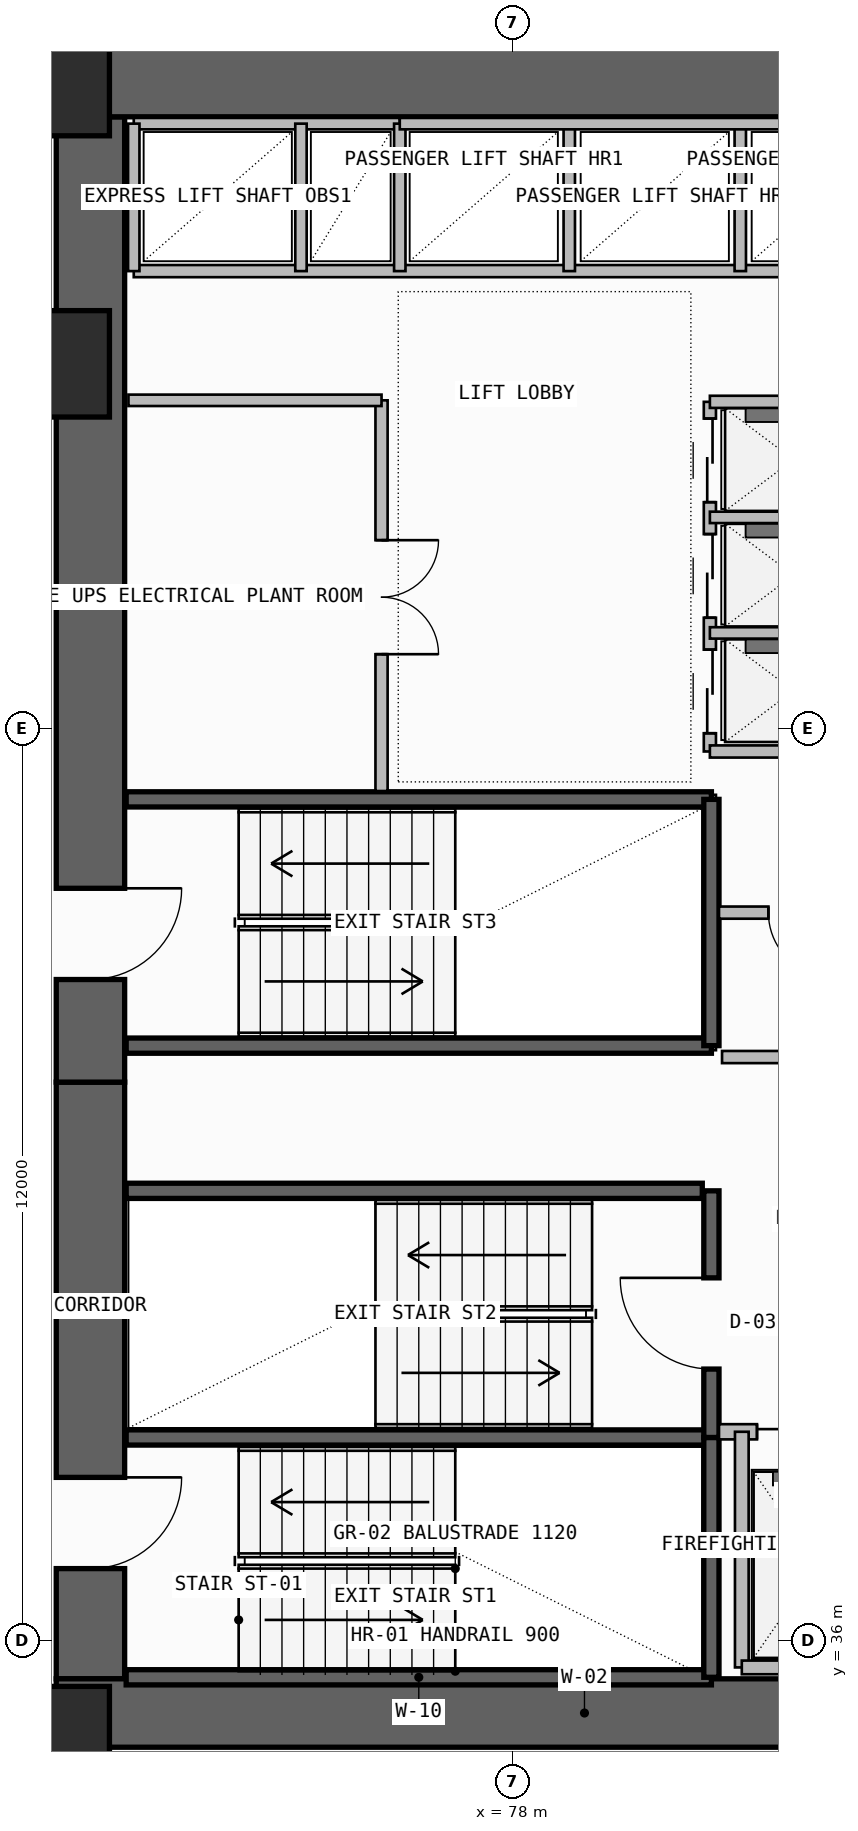
"""IFC4 building model, lengths in metres.
Left out: names, types, materials, properties, quantities, classifications, styles, units other than length and angle.
Written with IfcOpenShell. Run it as: python <this file> out.ifc"""

import sys

from ifc_helpers import new_model, si_unit, direction, frame, frame_2d, origin, origin_2d, place, context, subcontext, project, spatial, rectangle, extrude, element, fill, save


model = new_model("IFC4")
c1 = context("Model", 3, precision=1e-05, world=origin(), true_north=direction((0.0, 1.0)))
c2 = subcontext(c1, "Body", "Model", "MODEL_VIEW")
j1 = project(units=[si_unit("LENGTHUNIT", "METRE"), si_unit("PLANEANGLEUNIT", "RADIAN")], contexts=[c1])
p1 = place(None, origin())
s1 = spatial("IfcSite", under=j1, at=p1, CompositionType="ELEMENT")
p2 = place(p1, origin())
s2 = spatial("IfcBuilding", under=s1, at=p2, CompositionType="ELEMENT")
p3 = place(p2, frame((0.0, 0.0, 110.1)))
s3 = spatial("IfcBuildingStorey", under=s2, at=p3, CompositionType="ELEMENT", Elevation=110.1)
p4 = place(p3, frame((72.45, 35.5, -0.26), z_axis=(0.0, 0.0, 1.0), x_axis=(0.0, 1.0, 0.0)))
e1 = element("IfcWall", 1, at=p4, inside=s3, PredefinedType="SHEAR", context=c2, shape_type="SweptSolid", body=[
    extrude(rectangle(XDim=7.85, YDim=0.9, at=frame_2d((3.925, 0.0))), origin(), (0.0, 0.0, 1.0), 3.6),
])
p5 = place(p4, frame((1.45, 0.0, 0.26)))
e2 = element("IfcOpeningElement", 2, at=p5, cuts=e1, PredefinedType="OPENING", context=c2, shape_type="SweptSolid", body=[
    extrude(rectangle(XDim=1.2, YDim=2.2, at=frame_2d((0.6, 1.1))), frame((0.0, 0.46, 0.0), z_axis=(0.0, -1.0, 0.0), x_axis=(1.0, 0.0, 0.0)), (0.0, 0.0, 1.0), 0.92),
])
p6 = place(p3, frame((72.0, 35.05, -0.26), z_axis=(0.0, 0.0, 1.0), x_axis=(1.0, 0.0, 0.0)))
e3 = element("IfcWall", 3, at=p6, inside=s3, PredefinedType="SHEAR", context=c2, shape_type="SweptSolid", body=[
    extrude(rectangle(XDim=13.9, YDim=0.9, at=frame_2d((6.95, 0.0))), origin(), (0.0, 0.0, 1.0), 3.6),
])
p7 = place(p3, frame((72.45, 43.35, -0.26), z_axis=(0.0, 0.0, 1.0), x_axis=(0.0, 1.0, 0.0)))
e4 = element("IfcWall", 4, at=p7, inside=s3, PredefinedType="SHEAR", context=c2, shape_type="SweptSolid", body=[
    extrude(rectangle(XDim=12.7, YDim=0.9, at=frame_2d((6.35, 0.0))), origin(), (0.0, 0.0, 1.0), 3.6),
])
p8 = place(p7, frame((1.35, 0.0, 0.26)))
e5 = element("IfcOpeningElement", 5, at=p8, cuts=e4, PredefinedType="OPENING", context=c2, shape_type="SweptSolid", body=[
    extrude(rectangle(XDim=1.2, YDim=2.2, at=frame_2d((0.6, 1.1))), frame((0.0, 0.46, 0.0), z_axis=(0.0, -1.0, 0.0), x_axis=(1.0, 0.0, 0.0)), (0.0, 0.0, 1.0), 0.92),
])
p9 = place(p3, frame((72.0, 56.5, -0.26), z_axis=(0.0, 0.0, 1.0), x_axis=(1.0, 0.0, 0.0)))
e6 = element("IfcWall", 6, at=p9, inside=s3, PredefinedType="SHEAR", context=c2, shape_type="SweptSolid", body=[
    extrude(rectangle(XDim=13.9, YDim=0.9, at=frame_2d((6.95, 0.0))), origin(), (0.0, 0.0, 1.0), 3.6),
])
for number, where, z_axis, x_axis in (
    (7, (72.0, 34.7, 0.0), (0.0, 0.0, 1.0), (1.0, 0.0, 0.0)),
    (8, (72.0, 52.8, 0.0), (0.0, 0.0, 1.0), (1.0, 0.0, 0.0)),
    (9, (72.0, 56.5, 0.0), (0.0, 0.0, 1.0), (1.0, 0.0, 0.0)),
):
    element("IfcColumn", number, at=place(p3, frame(where, z_axis=z_axis, x_axis=x_axis)), inside=s3, PredefinedType="COLUMN", context=c2, shape_type="SweptSolid", body=[
        extrude(rectangle(XDim=1.4, YDim=1.4, at=origin_2d()), origin(), (0.0, 0.0, 1.0), 3.6),
    ])
for number, where, z_axis, x_axis in (
    (10, (72.92, 35.52, -0.26), (0.0, 0.0, 1.0), (1.0, 0.0, 0.0)),
    (11, (72.92, 38.675, -0.26), (0.0, 0.0, 1.0), (1.0, 0.0, 0.0)),
):
    element("IfcWall", number, at=place(p3, frame(where, z_axis=z_axis, x_axis=x_axis)), inside=s3, PredefinedType="SOLIDWALL", context=c2, shape_type="SweptSolid", body=[
        extrude(rectangle(XDim=7.7, YDim=0.2, at=frame_2d((3.85, 0.0))), origin(), (0.0, 0.0, 1.0), 3.6),
    ])
p10 = place(p3, frame((80.62, 35.52, -0.26), z_axis=(0.0, 0.0, 1.0), x_axis=(0.0, 1.0, 0.0)))
e12 = element("IfcWall", 12, at=p10, inside=s3, PredefinedType="SOLIDWALL", context=c2, shape_type="SweptSolid", body=[
    extrude(rectangle(XDim=3.155, YDim=0.2, at=frame_2d((1.578, 0.0))), origin(), (0.0, 0.0, 1.0), 3.6),
])
p11 = place(p3, frame((80.62, 38.675, -0.26), z_axis=(0.0, 0.0, 1.0), x_axis=(0.0, 1.0, 0.0)))
e13 = element("IfcWall", 13, at=p11, inside=s3, PredefinedType="SOLIDWALL", context=c2, shape_type="SweptSolid", body=[
    extrude(rectangle(XDim=3.245, YDim=0.2, at=frame_2d((1.623, 0.0))), origin(), (0.0, 0.0, 1.0), 3.6),
])
p12 = place(p11, frame((0.9, 0.0, 0.26)))
e14 = element("IfcOpeningElement", 14, at=p12, cuts=e13, PredefinedType="OPENING", context=c2, shape_type="SweptSolid", body=[
    extrude(rectangle(XDim=1.2, YDim=2.2, at=frame_2d((0.6, 1.1))), frame((0.0, 0.11, 0.0), z_axis=(0.0, -1.0, 0.0), x_axis=(1.0, 0.0, 0.0)), (0.0, 0.0, 1.0), 0.22),
])
p13 = place(p3, frame((80.72, 38.75, 0.0), z_axis=(0.0, 0.0, 1.0), x_axis=(1.0, 0.0, 0.0)))
e15 = element("IfcWall", 15, at=p13, inside=s3, PredefinedType="SOLIDWALL", context=c2, shape_type="SweptSolid", body=[
    extrude(rectangle(XDim=4.26, YDim=0.2, at=frame_2d((2.13, 0.0))), origin(), (0.0, 0.0, 1.0), 3.34),
])
p14 = place(p13, frame((0.5, 0.0, 0.0)))
e16 = element("IfcOpeningElement", 16, at=p14, cuts=e15, PredefinedType="OPENING", context=c2, shape_type="SweptSolid", body=[
    extrude(rectangle(XDim=1.3, YDim=2.3, at=frame_2d((0.65, 1.15))), frame((0.0, 0.11, 0.0), z_axis=(0.0, -1.0, 0.0), x_axis=(1.0, 0.0, 0.0)), (0.0, 0.0, 1.0), 0.22),
])
p15 = place(p13, frame((2.45, 0.0, 0.0)))
e17 = element("IfcOpeningElement", 17, at=p15, cuts=e15, PredefinedType="OPENING", context=c2, shape_type="SweptSolid", body=[
    extrude(rectangle(XDim=1.3, YDim=2.3, at=frame_2d((0.65, 1.15))), frame((0.0, 0.11, 0.0), z_axis=(0.0, -1.0, 0.0), x_axis=(1.0, 0.0, 0.0)), (0.0, 0.0, 1.0), 0.22),
])
p16 = place(p3, frame((81.02, 35.65, 0.0), z_axis=(0.0, 0.0, 1.0), x_axis=(0.0, 1.0, 0.0)))
e18 = element("IfcWall", 18, at=p16, inside=s3, PredefinedType="SOLIDWALL", context=c2, shape_type="SweptSolid", body=[
    extrude(rectangle(XDim=3.1, YDim=0.18, at=frame_2d((1.55, 0.0))), origin(), (0.0, 0.0, 1.0), 3.34),
])
p17 = place(p3, frame((81.02, 35.65, 0.0), z_axis=(0.0, 0.0, 1.0), x_axis=(1.0, 0.0, 0.0)))
e19 = element("IfcWall", 19, at=p17, inside=s3, PredefinedType="SOLIDWALL", context=c2, shape_type="SweptSolid", body=[
    extrude(rectangle(XDim=3.93, YDim=0.18, at=frame_2d((1.965, 0.0))), origin(), (0.0, 0.0, 1.0), 3.34),
])
p18 = place(p3, frame((72.92, 41.92, -0.26), z_axis=(0.0, 0.0, 1.0), x_axis=(1.0, 0.0, 0.0)))
e20 = element("IfcWall", 20, at=p18, inside=s3, PredefinedType="SOLIDWALL", context=c2, shape_type="SweptSolid", body=[
    extrude(rectangle(XDim=7.58, YDim=0.2, at=frame_2d((3.79, 0.0))), origin(), (0.0, 0.0, 1.0), 3.6),
])
for number, where, z_axis, x_axis in (
    (21, (72.92, 43.83, -0.26), (0.0, 0.0, 1.0), (1.0, 0.0, 0.0)),
    (22, (72.92, 47.07, -0.26), (0.0, 0.0, 1.0), (1.0, 0.0, 0.0)),
):
    element("IfcWall", number, at=place(p3, frame(where, z_axis=z_axis, x_axis=x_axis)), inside=s3, PredefinedType="SOLIDWALL", context=c2, shape_type="SweptSolid", body=[
        extrude(rectangle(XDim=7.7, YDim=0.2, at=frame_2d((3.85, 0.0))), origin(), (0.0, 0.0, 1.0), 3.6),
    ])
p19 = place(p3, frame((80.62, 43.83, -0.26), z_axis=(0.0, 0.0, 1.0), x_axis=(0.0, 1.0, 0.0)))
e23 = element("IfcWall", 23, at=p19, inside=s3, PredefinedType="SOLIDWALL", context=c2, shape_type="SweptSolid", body=[
    extrude(rectangle(XDim=3.24, YDim=0.2, at=frame_2d((1.62, 0.0))), origin(), (0.0, 0.0, 1.0), 3.6),
])
p20 = place(p3, frame((80.72, 45.58, 0.0), z_axis=(0.0, 0.0, 1.0), x_axis=(1.0, 0.0, 0.0)))
e24 = element("IfcWall", 24, at=p20, inside=s3, PredefinedType="PLUMBINGWALL", context=c2, shape_type="SweptSolid", body=[
    extrude(rectangle(XDim=4.23, YDim=0.16, at=frame_2d((2.115, 0.0))), origin(), (0.0, 0.0, 1.0), 3.34),
])
p21 = place(p20, frame((0.65, 0.0, 0.0)))
e25 = element("IfcOpeningElement", 25, at=p21, cuts=e24, PredefinedType="OPENING", context=c2, shape_type="SweptSolid", body=[
    extrude(rectangle(XDim=0.85, YDim=2.05, at=frame_2d((0.425, 1.025))), frame((0.0, 0.09, 0.0), z_axis=(0.0, -1.0, 0.0), x_axis=(1.0, 0.0, 0.0)), (0.0, 0.0, 1.0), 0.18),
])
p22 = place(p20, frame((2.95, 0.0, 0.0)))
e26 = element("IfcOpeningElement", 26, at=p22, cuts=e24, PredefinedType="OPENING", context=c2, shape_type="SweptSolid", body=[
    extrude(rectangle(XDim=0.85, YDim=2.05, at=frame_2d((0.425, 1.025))), frame((0.0, 0.09, 0.0), z_axis=(0.0, -1.0, 0.0), x_axis=(1.0, 0.0, 0.0)), (0.0, 0.0, 1.0), 0.18),
])
p23 = place(p3, frame((80.76, 43.68, 0.0), z_axis=(0.0, 0.0, 1.0), x_axis=(1.0, 0.0, 0.0)))
e27 = element("IfcWall", 27, at=p23, inside=s3, PredefinedType="PLUMBINGWALL", context=c2, shape_type="SweptSolid", body=[
    extrude(rectangle(XDim=4.19, YDim=0.16, at=frame_2d((2.095, 0.0))), origin(), (0.0, 0.0, 1.0), 3.34),
])
p24 = place(p3, frame((76.28, 47.18, 0.0), z_axis=(0.0, 0.0, 1.0), x_axis=(0.0, 1.0, 0.0)))
e28 = element("IfcWall", 28, at=p24, inside=s3, PredefinedType="SOLIDWALL", context=c2, shape_type="SweptSolid", body=[
    extrude(rectangle(XDim=5.14, YDim=0.16, at=frame_2d((2.57, 0.0))), origin(), (0.0, 0.0, 1.0), 3.34),
])
p25 = place(p24, frame((1.8, 0.0, 0.0)))
e29 = element("IfcOpeningElement", 29, at=p25, cuts=e28, PredefinedType="OPENING", context=c2, shape_type="SweptSolid", body=[
    extrude(rectangle(XDim=1.5, YDim=2.25, at=frame_2d((0.75, 1.125))), frame((0.0, 0.09, 0.0), z_axis=(0.0, -1.0, 0.0), x_axis=(1.0, 0.0, 0.0)), (0.0, 0.0, 1.0), 0.18),
])
p26 = place(p3, frame((72.95, 52.32, 0.0), z_axis=(0.0, 0.0, 1.0), x_axis=(1.0, 0.0, 0.0)))
e30 = element("IfcWall", 30, at=p26, inside=s3, PredefinedType="SOLIDWALL", context=c2, shape_type="SweptSolid", body=[
    extrude(rectangle(XDim=3.33, YDim=0.15, at=frame_2d((1.665, 0.0))), origin(), (0.0, 0.0, 1.0), 3.34),
])
p27 = place(p3, frame((80.6, 47.7, 0.0), z_axis=(0.0, 0.0, 1.0), x_axis=(0.0, 1.0, 0.0)))
e31 = element("IfcWall", 31, at=p27, inside=s3, PredefinedType="SOLIDWALL", context=c2, shape_type="SweptSolid", body=[
    extrude(rectangle(XDim=4.6, YDim=0.16, at=frame_2d((2.3, 0.0))), origin(), (0.0, 0.0, 1.0), 3.34),
])
p28 = place(p27, frame((0.24, 0.0, 0.0)))
e32 = element("IfcOpeningElement", 32, at=p28, cuts=e31, PredefinedType="OPENING", context=c2, shape_type="SweptSolid", body=[
    extrude(rectangle(XDim=1.1, YDim=2.25, at=frame_2d((0.55, 1.125))), frame((0.0, 0.09, 0.0), z_axis=(0.0, -1.0, 0.0), x_axis=(1.0, 0.0, 0.0)), (0.0, 0.0, 1.0), 0.18),
])
p29 = place(p27, frame((1.76, 0.0, 0.0)))
e33 = element("IfcOpeningElement", 33, at=p29, cuts=e31, PredefinedType="OPENING", context=c2, shape_type="SweptSolid", body=[
    extrude(rectangle(XDim=1.1, YDim=2.25, at=frame_2d((0.55, 1.125))), frame((0.0, 0.09, 0.0), z_axis=(0.0, -1.0, 0.0), x_axis=(1.0, 0.0, 0.0)), (0.0, 0.0, 1.0), 0.18),
])
p30 = place(p27, frame((3.28, 0.0, 0.0)))
e34 = element("IfcOpeningElement", 34, at=p30, cuts=e31, PredefinedType="OPENING", context=c2, shape_type="SweptSolid", body=[
    extrude(rectangle(XDim=1.1, YDim=2.25, at=frame_2d((0.55, 1.125))), frame((0.0, 0.09, 0.0), z_axis=(0.0, -1.0, 0.0), x_axis=(1.0, 0.0, 0.0)), (0.0, 0.0, 1.0), 0.18),
])
p31 = place(p3, frame((80.6, 47.7, 0.0), z_axis=(0.0, 0.0, 1.0), x_axis=(1.0, 0.0, 0.0)))
e35 = element("IfcWall", 35, at=p31, inside=s3, PredefinedType="SOLIDWALL", context=c2, shape_type="SweptSolid", body=[
    extrude(rectangle(XDim=4.4, YDim=0.16, at=frame_2d((2.2, 0.0))), origin(), (0.0, 0.0, 1.0), 3.34),
])
p32 = place(p3, frame((80.6, 52.3, 0.0), z_axis=(0.0, 0.0, 1.0), x_axis=(1.0, 0.0, 0.0)))
e36 = element("IfcWall", 36, at=p32, inside=s3, PredefinedType="SOLIDWALL", context=c2, shape_type="SweptSolid", body=[
    extrude(rectangle(XDim=4.22, YDim=0.16, at=frame_2d((2.11, 0.0))), origin(), (0.0, 0.0, 1.0), 3.34),
])
for number, where, z_axis, x_axis in (
    (37, (80.6, 49.26, 0.0), (0.0, 0.0, 1.0), (1.0, 0.0, 0.0)),
    (38, (80.6, 50.78, 0.0), (0.0, 0.0, 1.0), (1.0, 0.0, 0.0)),
):
    element("IfcWall", number, at=place(p3, frame(where, z_axis=z_axis, x_axis=x_axis)), inside=s3, PredefinedType="PLUMBINGWALL", context=c2, shape_type="SweptSolid", body=[
        extrude(rectangle(XDim=2.2, YDim=0.15, at=frame_2d((1.1, 0.0))), origin(), (0.0, 0.0, 1.0), 3.34),
    ])
p33 = place(p3, frame((73.02, 54.02, 0.0), z_axis=(0.0, 0.0, 1.0), x_axis=(1.0, 0.0, 0.0)))
e39 = element("IfcWall", 39, at=p33, inside=s3, PredefinedType="SOLIDWALL", context=c2, shape_type="SweptSolid", body=[
    extrude(rectangle(XDim=12.08, YDim=0.16, at=frame_2d((6.04, 0.0))), origin(), (0.0, 0.0, 1.0), 3.34),
])
p34 = place(p3, frame((73.02, 55.96, 0.0), z_axis=(0.0, 0.0, 1.0), x_axis=(1.0, 0.0, 0.0)))
e40 = element("IfcWall", 40, at=p34, inside=s3, PredefinedType="SOLIDWALL", context=c2, shape_type="SweptSolid", body=[
    extrude(rectangle(XDim=3.5, YDim=0.15, at=frame_2d((1.75, 0.0))), origin(), (0.0, 0.0, 1.0), 3.34),
])
p35 = place(p3, frame((73.02, 54.02, 0.0), z_axis=(0.0, 0.0, 1.0), x_axis=(0.0, 1.0, 0.0)))
e41 = element("IfcWall", 41, at=p35, inside=s3, PredefinedType="PLUMBINGWALL", context=c2, shape_type="SweptSolid", body=[
    extrude(rectangle(XDim=1.94, YDim=0.15, at=frame_2d((0.97, 0.0))), origin(), (0.0, 0.0, 1.0), 3.34),
])
p36 = place(p3, frame((76.52, 54.02, 0.0), z_axis=(0.0, 0.0, 1.0), x_axis=(0.0, 1.0, 0.0)))
e42 = element("IfcWall", 42, at=p36, inside=s3, PredefinedType="SOLIDWALL", context=c2, shape_type="SweptSolid", body=[
    extrude(rectangle(XDim=1.94, YDim=0.15, at=frame_2d((0.97, 0.0))), origin(), (0.0, 0.0, 1.0), 3.34),
])
p37 = place(p3, frame((75.22, 54.02, 0.0), z_axis=(0.0, 0.0, 1.0), x_axis=(0.0, 1.0, 0.0)))
e43 = element("IfcWall", 43, at=p37, inside=s3, PredefinedType="PLUMBINGWALL", context=c2, shape_type="SweptSolid", body=[
    extrude(rectangle(XDim=1.94, YDim=0.15, at=frame_2d((0.97, 0.0))), origin(), (0.0, 0.0, 1.0), 3.34),
])
for number, where, z_axis, x_axis in (
    (44, (78.75, 54.02, 0.0), (0.0, 0.0, 1.0), (0.0, 1.0, 0.0)),
    (45, (81.0, 54.02, 0.0), (0.0, 0.0, 1.0), (0.0, 1.0, 0.0)),
):
    element("IfcWall", number, at=place(p3, frame(where, z_axis=z_axis, x_axis=x_axis)), inside=s3, PredefinedType="PLUMBINGWALL", context=c2, shape_type="SweptSolid", body=[
        extrude(rectangle(XDim=1.96, YDim=0.15, at=frame_2d((0.98, 0.0))), origin(), (0.0, 0.0, 1.0), 3.34),
    ])
p38 = place(p3, frame((76.52, 55.96, 0.0), z_axis=(0.0, 0.0, 1.0), x_axis=(1.0, 0.0, 0.0)))
e46 = element("IfcWall", 46, at=p38, inside=s3, PredefinedType="SOLIDWALL", context=c2, shape_type="SweptSolid", body=[
    extrude(rectangle(XDim=6.7, YDim=0.15, at=frame_2d((3.35, 0.0))), origin(), (0.0, 0.0, 1.0), 3.34),
])
p39 = place(p5, frame((1.2, 0.0, 0.0), z_axis=(0.0, 0.0, 1.0), x_axis=(-1.0, 0.0, 0.0)))
e47 = element("IfcDoor", 47, at=p39, inside=s3, OperationType="SINGLE_SWING_LEFT", PredefinedType="USERDEFINED", context=c2, shape_type="SweptSolid", body=[
    extrude(rectangle(XDim=1.2, YDim=2.2, at=frame_2d((0.6, 1.1))), frame((0.0, 0.025, 0.0), z_axis=(0.0, -1.0, 0.0), x_axis=(1.0, 0.0, 0.0)), (0.0, 0.0, 1.0), 0.05),
])
fill(e2, e47)
p40 = place(p12, origin())
e48 = element("IfcDoor", 48, at=p40, inside=s3, OperationType="SINGLE_SWING_RIGHT", PredefinedType="USERDEFINED", context=c2, shape_type="SweptSolid", body=[
    extrude(rectangle(XDim=1.2, YDim=2.2, at=frame_2d((0.6, 1.1))), frame((0.0, 0.025, 0.0), z_axis=(0.0, -1.0, 0.0), x_axis=(1.0, 0.0, 0.0)), (0.0, 0.0, 1.0), 0.05),
])
fill(e14, e48)
p41 = place(p14, origin())
e49 = element("IfcDoor", 49, at=p41, inside=s3, OperationType="DOUBLE_DOOR_SLIDING", PredefinedType="DOOR", context=c2, shape_type="SweptSolid", body=[
    extrude(rectangle(XDim=1.3, YDim=2.3, at=frame_2d((0.65, 1.15))), frame((0.0, 0.025, 0.0), z_axis=(0.0, -1.0, 0.0), x_axis=(1.0, 0.0, 0.0)), (0.0, 0.0, 1.0), 0.05),
])
fill(e16, e49)
p42 = place(p8, frame((1.2, 0.0, 0.0), z_axis=(0.0, 0.0, 1.0), x_axis=(-1.0, 0.0, 0.0)))
e50 = element("IfcDoor", 50, at=p42, inside=s3, OperationType="SINGLE_SWING_LEFT", PredefinedType="USERDEFINED", context=c2, shape_type="SweptSolid", body=[
    extrude(rectangle(XDim=1.2, YDim=2.2, at=frame_2d((0.6, 1.1))), frame((0.0, 0.025, 0.0), z_axis=(0.0, -1.0, 0.0), x_axis=(1.0, 0.0, 0.0)), (0.0, 0.0, 1.0), 0.05),
])
fill(e5, e50)
p43 = place(p21, frame((0.85, 0.0, 0.0), z_axis=(0.0, 0.0, 1.0), x_axis=(-1.0, 0.0, 0.0)))
e51 = element("IfcDoor", 51, at=p43, inside=s3, OperationType="SINGLE_SWING_LEFT", PredefinedType="DOOR", context=c2, shape_type="SweptSolid", body=[
    extrude(rectangle(XDim=0.85, YDim=2.05, at=frame_2d((0.425, 1.025))), frame((0.0, 0.025, 0.0), z_axis=(0.0, -1.0, 0.0), x_axis=(1.0, 0.0, 0.0)), (0.0, 0.0, 1.0), 0.05),
])
fill(e25, e51)
p44 = place(p25, frame((1.5, 0.0, 0.0), z_axis=(0.0, 0.0, 1.0), x_axis=(-1.0, 0.0, 0.0)))
e52 = element("IfcDoor", 52, at=p44, inside=s3, OperationType="DOUBLE_DOOR_SINGLE_SWING", PredefinedType="DOOR", context=c2, shape_type="SweptSolid", body=[
    extrude(rectangle(XDim=1.5, YDim=2.25, at=frame_2d((0.75, 1.125))), frame((0.0, 0.025, 0.0), z_axis=(0.0, -1.0, 0.0), x_axis=(1.0, 0.0, 0.0)), (0.0, 0.0, 1.0), 0.05),
])
fill(e29, e52)
p45 = place(p28, frame((1.1, 0.0, 0.0), z_axis=(0.0, 0.0, 1.0), x_axis=(-1.0, 0.0, 0.0)))
e53 = element("IfcDoor", 53, at=p45, inside=s3, OperationType="DOUBLE_DOOR_SLIDING", PredefinedType="DOOR", context=c2, shape_type="SweptSolid", body=[
    extrude(rectangle(XDim=1.1, YDim=2.25, at=frame_2d((0.55, 1.125))), frame((0.0, 0.025, 0.0), z_axis=(0.0, -1.0, 0.0), x_axis=(1.0, 0.0, 0.0)), (0.0, 0.0, 1.0), 0.05),
])
fill(e32, e53)
p46 = place(p29, frame((1.1, 0.0, 0.0), z_axis=(0.0, 0.0, 1.0), x_axis=(-1.0, 0.0, 0.0)))
e54 = element("IfcDoor", 54, at=p46, inside=s3, OperationType="DOUBLE_DOOR_SLIDING", PredefinedType="DOOR", context=c2, shape_type="SweptSolid", body=[
    extrude(rectangle(XDim=1.1, YDim=2.25, at=frame_2d((0.55, 1.125))), frame((0.0, 0.025, 0.0), z_axis=(0.0, -1.0, 0.0), x_axis=(1.0, 0.0, 0.0)), (0.0, 0.0, 1.0), 0.05),
])
fill(e33, e54)
p47 = place(p30, frame((1.1, 0.0, 0.0), z_axis=(0.0, 0.0, 1.0), x_axis=(-1.0, 0.0, 0.0)))
e55 = element("IfcDoor", 55, at=p47, inside=s3, OperationType="DOUBLE_DOOR_SLIDING", PredefinedType="DOOR", context=c2, shape_type="SweptSolid", body=[
    extrude(rectangle(XDim=1.1, YDim=2.25, at=frame_2d((0.55, 1.125))), frame((0.0, 0.025, 0.0), z_axis=(0.0, -1.0, 0.0), x_axis=(1.0, 0.0, 0.0)), (0.0, 0.0, 1.0), 0.05),
])
fill(e34, e55)
save(model, sys.argv[1])
